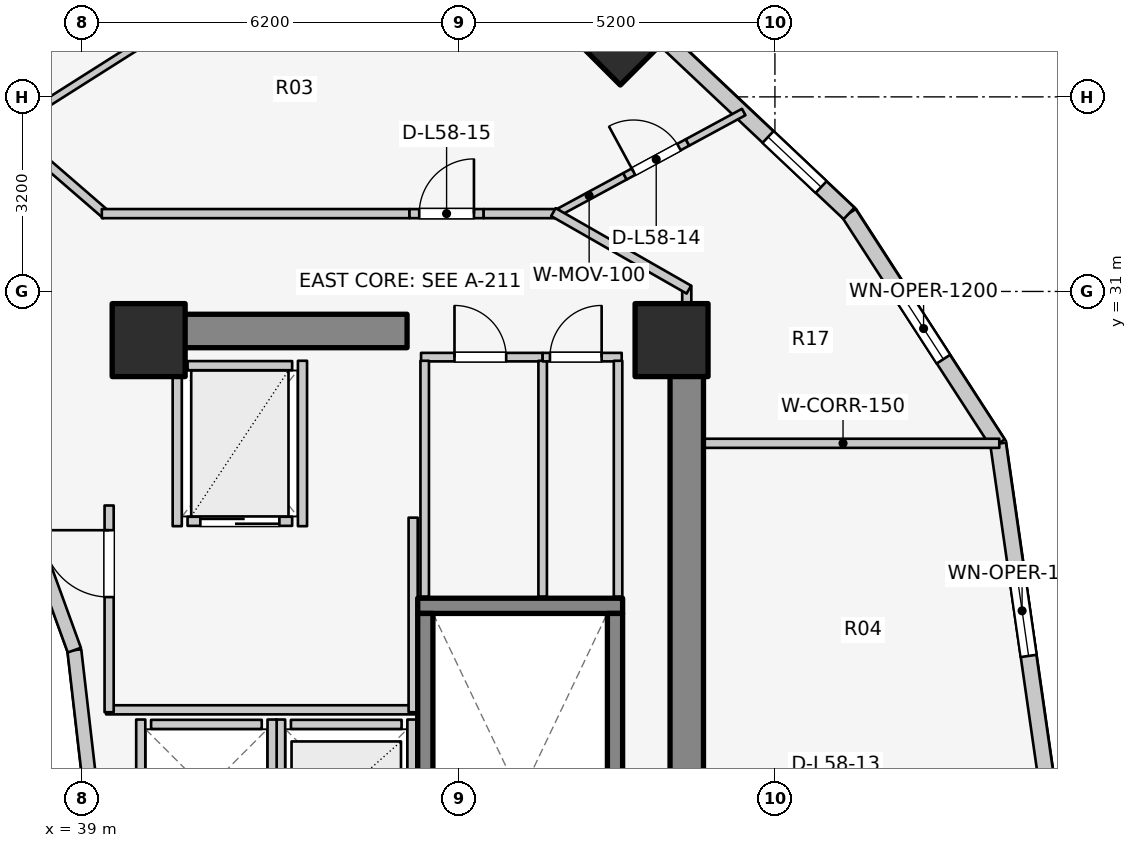
"""IFC4 building model, lengths in metres.
Left out: names, types, materials, properties, quantities, classifications, styles, units other than length and angle.
Written with IfcOpenShell. Run it as: python <this file> out.ifc"""

import sys

from ifc_helpers import new_model, si_unit, direction, frame, frame_2d, origin, origin_2d, place, context, subcontext, project, spatial, rectangle, extrude, element, fill, save


model = new_model("IFC4")
c1 = context("Model", 3, precision=1e-05, world=origin(), true_north=direction((0.0, 1.0)))
c2 = subcontext(c1, "Body", "Model", "MODEL_VIEW")
j1 = project(units=[si_unit("LENGTHUNIT", "METRE"), si_unit("PLANEANGLEUNIT", "RADIAN")], contexts=[c1])
p1 = place(None, origin())
s1 = spatial("IfcSite", under=j1, at=p1, CompositionType="ELEMENT")
p2 = place(p1, origin())
s2 = spatial("IfcBuilding", under=s1, at=p2, CompositionType="ELEMENT")
p3 = place(p2, frame((0.0, 0.0, 190.1)))
s3 = spatial("IfcBuildingStorey", under=s2, at=p3, CompositionType="ELEMENT", Elevation=190.1)
p4 = place(p3, frame((48.95, 17.05, 0.0), z_axis=(0.0, 0.0, 1.0), x_axis=(0.0, 1.0, 0.0)))
e1 = element("IfcWall", 1, at=p4, inside=s3, PredefinedType="SHEAR", context=c2, shape_type="SweptSolid", body=[
    extrude(rectangle(XDim=12.8, YDim=0.55, at=frame_2d((6.4, 0.0))), origin(), (0.0, 0.0, 1.0), 3.1),
])
p5 = place(p3, frame((39.85, 30.35, 0.0), z_axis=(0.0, 0.0, 1.0), x_axis=(1.0, 0.0, 0.0)))
e2 = element("IfcWall", 2, at=p5, inside=s3, PredefinedType="SHEAR", context=c2, shape_type="SweptSolid", body=[
    extrude(rectangle(XDim=4.5, YDim=0.55, at=frame_2d((2.25, 0.0))), origin(), (0.0, 0.0, 1.0), 3.1),
])
p6 = place(p3, frame((44.525, 25.83, 0.0), z_axis=(0.0, 0.0, 1.0), x_axis=(1.0, 0.0, 0.0)))
e3 = element("IfcWall", 3, at=p6, inside=s3, PredefinedType="SOLIDWALL", context=c2, shape_type="SweptSolid", body=[
    extrude(rectangle(XDim=3.37, YDim=0.25, at=frame_2d((1.685, 0.0))), origin(), (0.0, 0.0, 1.0), 3.1),
])
for number, where, z_axis, x_axis in (
    (4, (44.65, 17.895, 0.0), (0.0, 0.0, 1.0), (0.0, 1.0, 0.0)),
    (5, (47.77, 17.895, 0.0), (0.0, 0.0, 1.0), (0.0, 1.0, 0.0)),
):
    element("IfcWall", number, at=place(p3, frame(where, z_axis=z_axis, x_axis=x_axis)), inside=s3, PredefinedType="SOLIDWALL", context=c2, shape_type="SweptSolid", body=[
        extrude(rectangle(XDim=7.81, YDim=0.25, at=frame_2d((3.905, 0.0))), origin(), (0.0, 0.0, 1.0), 3.1),
    ])
for number, where, z_axis, x_axis in (
    (6, (48.7, 30.2, 0.0), (0.0, 0.0, 1.0), (1.0, 0.0, 0.0)),
    (7, (40.1, 30.2, 0.0), (0.0, 0.0, 1.0), (1.0, 0.0, 0.0)),
):
    element("IfcColumn", number, at=place(p3, frame(where, z_axis=z_axis, x_axis=x_axis)), inside=s3, PredefinedType="COLUMN", context=c2, shape_type="SweptSolid", body=[
        extrude(rectangle(XDim=1.2, YDim=1.2, at=origin_2d()), origin(), (0.0, 0.0, 1.0), 3.1),
    ])
p7 = place(p3, frame((47.857, 35.031, 0.0), z_axis=(0.0, 0.0, 1.0), x_axis=(0.707106781187, 0.707106781187, 0.0)))
e8 = element("IfcColumn", 8, at=p7, inside=s3, PredefinedType="COLUMN", context=c2, shape_type="SweptSolid", body=[
    extrude(rectangle(XDim=0.9, YDim=0.9, at=origin_2d()), origin(), (0.0, 0.0, 1.0), 3.1),
])
p8 = place(p3, frame((39.12, 23.0, 0.0), z_axis=(0.0, 0.0, 1.0), x_axis=(-0.114711713601, 0.993398823617, 0.0)))
e9 = element("IfcWall", 9, at=p8, inside=s3, PredefinedType="STANDARD", context=c2, shape_type="SweptSolid", body=[
    extrude(rectangle(XDim=2.115, YDim=0.23, at=frame_2d((1.058, 0.0))), origin(), (0.0, 0.0, 1.0), 2.56),
])
p9 = place(p3, frame((38.877, 25.102, 0.0), z_axis=(0.0, 0.0, 1.0), x_axis=(-0.341423187295, 0.93990968033, 0.0)))
e10 = element("IfcWall", 10, at=p9, inside=s3, PredefinedType="STANDARD", context=c2, shape_type="SweptSolid", body=[
    extrude(rectangle(XDim=2.084, YDim=0.23, at=frame_2d((1.042, 0.0))), origin(), (0.0, 0.0, 1.0), 2.56),
])
p10 = place(p3, frame((54.86, 23.0, 0.0), z_axis=(0.0, 0.0, 1.0), x_axis=(-0.142227632286, 0.989833976288, 0.0)))
e11 = element("IfcWall", 11, at=p10, inside=s3, PredefinedType="STANDARD", context=c2, shape_type="SweptSolid", body=[
    extrude(rectangle(XDim=5.553, YDim=0.26, at=frame_2d((2.776, 0.0))), origin(), (0.0, 0.0, 1.0), 2.57),
])
p11 = place(p10, frame((2.027, 0.0, 0.75)))
e12 = element("IfcOpeningElement", 12, at=p11, cuts=e11, PredefinedType="OPENING", context=c2, shape_type="SweptSolid", body=[
    extrude(rectangle(XDim=1.5, YDim=1.6, at=frame_2d((0.75, 0.8))), frame((0.0, 0.14, 0.0), z_axis=(0.0, -1.0, 0.0), x_axis=(1.0, 0.0, 0.0)), (0.0, 0.0, 1.0), 0.28),
])
p12 = place(p3, frame((54.07, 28.497, 0.0), z_axis=(0.0, 0.0, 1.0), x_axis=(-0.543358984534, 0.839500454989, 0.0)))
e13 = element("IfcWall", 13, at=p12, inside=s3, PredefinedType="STANDARD", context=c2, shape_type="SweptSolid", body=[
    extrude(rectangle(XDim=4.511, YDim=0.26, at=frame_2d((2.256, 0.0))), origin(), (0.0, 0.0, 1.0), 1.22),
])
p13 = place(p12, frame((1.656, 0.0, 0.15)))
e14 = element("IfcOpeningElement", 14, at=p13, cuts=e13, PredefinedType="OPENING", context=c2, shape_type="SweptSolid", body=[
    extrude(rectangle(XDim=1.2, YDim=0.9, at=frame_2d((0.6, 0.45))), frame((0.0, 0.14, 0.0), z_axis=(0.0, -1.0, 0.0), x_axis=(1.0, 0.0, 0.0)), (0.0, 0.0, 1.0), 0.28),
])
p14 = place(p3, frame((51.619, 32.284, 0.0), z_axis=(0.0, 0.0, 1.0), x_axis=(-0.727667301037, 0.68593024354, 0.0)))
e15 = element("IfcWall", 15, at=p14, inside=s3, PredefinedType="STANDARD", context=c2, shape_type="SweptSolid", body=[
    extrude(rectangle(XDim=4.604, YDim=0.26, at=frame_2d((2.302, 0.0))), origin(), (0.0, 0.0, 1.0), 1.22),
])
p15 = place(p14, frame((0.631, 0.0, 0.15)))
e16 = element("IfcOpeningElement", 16, at=p15, cuts=e15, PredefinedType="OPENING", context=c2, shape_type="SweptSolid", body=[
    extrude(rectangle(XDim=1.2, YDim=0.9, at=frame_2d((0.6, 0.45))), frame((0.0, 0.14, 0.0), z_axis=(0.0, -1.0, 0.0), x_axis=(1.0, 0.0, 0.0)), (0.0, 0.0, 1.0), 0.28),
])
p16 = place(p3, frame((42.44, 23.88, 0.0), z_axis=(0.0, 0.0, 1.0), x_axis=(1.0, 0.0, 0.0)))
e17 = element("IfcWall", 17, at=p16, inside=s3, PredefinedType="SOLIDWALL", context=c2, shape_type="SweptSolid", body=[
    extrude(rectangle(XDim=1.82, YDim=0.15, at=frame_2d((0.91, 0.0))), origin(), (0.0, 0.0, 1.0), 2.575),
])
for number, where, z_axis, x_axis in (
    (18, (42.27, 21.64, 0.0), (0.0, 0.0, 1.0), (0.0, 1.0, 0.0)),
    (19, (44.43, 21.64, 0.0), (0.0, 0.0, 1.0), (0.0, 1.0, 0.0)),
):
    element("IfcWall", number, at=place(p3, frame(where, z_axis=z_axis, x_axis=x_axis)), inside=s3, PredefinedType="SOLIDWALL", context=c2, shape_type="SweptSolid", body=[
        extrude(rectangle(XDim=2.32, YDim=0.15, at=frame_2d((1.16, 0.0))), origin(), (0.0, 0.0, 1.0), 2.575),
    ])
p17 = place(p3, frame((40.14, 23.88, 0.0), z_axis=(0.0, 0.0, 1.0), x_axis=(1.0, 0.0, 0.0)))
e20 = element("IfcWall", 20, at=p17, inside=s3, PredefinedType="SOLIDWALL", context=c2, shape_type="SweptSolid", body=[
    extrude(rectangle(XDim=1.82, YDim=0.15, at=frame_2d((0.91, 0.0))), origin(), (0.0, 0.0, 1.0), 2.12),
])
p18 = place(p3, frame((39.97, 21.64, 0.0), z_axis=(0.0, 0.0, 1.0), x_axis=(0.0, 1.0, 0.0)))
e21 = element("IfcWall", 21, at=p18, inside=s3, PredefinedType="SOLIDWALL", context=c2, shape_type="SweptSolid", body=[
    extrude(rectangle(XDim=2.32, YDim=0.15, at=frame_2d((1.16, 0.0))), origin(), (0.0, 0.0, 1.0), 2.12),
])
p19 = place(p3, frame((42.13, 21.64, 0.0), z_axis=(0.0, 0.0, 1.0), x_axis=(0.0, 1.0, 0.0)))
e22 = element("IfcWall", 22, at=p19, inside=s3, PredefinedType="SOLIDWALL", context=c2, shape_type="SweptSolid", body=[
    extrude(rectangle(XDim=2.32, YDim=0.15, at=frame_2d((1.16, 0.0))), origin(), (0.0, 0.0, 1.0), 2.575),
])
p20 = place(p3, frame((40.74, 27.22, 0.0), z_axis=(0.0, 0.0, 1.0), x_axis=(1.0, 0.0, 0.0)))
e23 = element("IfcWall", 23, at=p20, inside=s3, PredefinedType="SOLIDWALL", context=c2, shape_type="SweptSolid", body=[
    extrude(rectangle(XDim=1.72, YDim=0.15, at=frame_2d((0.86, 0.0))), origin(), (0.0, 0.0, 1.0), 2.575),
])
p21 = place(p20, frame((0.21, 0.0, 0.0)))
e24 = element("IfcOpeningElement", 24, at=p21, cuts=e23, PredefinedType="OPENING", context=c2, shape_type="SweptSolid", body=[
    extrude(rectangle(XDim=1.3, YDim=2.1, at=frame_2d((0.65, 1.05))), frame((0.0, 0.085, 0.0), z_axis=(0.0, -1.0, 0.0), x_axis=(1.0, 0.0, 0.0)), (0.0, 0.0, 1.0), 0.17),
])
p22 = place(p3, frame((40.74, 29.78, 0.0), z_axis=(0.0, 0.0, 1.0), x_axis=(1.0, 0.0, 0.0)))
e25 = element("IfcWall", 25, at=p22, inside=s3, PredefinedType="SOLIDWALL", context=c2, shape_type="SweptSolid", body=[
    extrude(rectangle(XDim=1.72, YDim=0.15, at=frame_2d((0.86, 0.0))), origin(), (0.0, 0.0, 1.0), 2.575),
])
for number, where, z_axis, x_axis in (
    (26, (40.57, 27.14, 0.0), (0.0, 0.0, 1.0), (0.0, 1.0, 0.0)),
    (27, (42.63, 27.14, 0.0), (0.0, 0.0, 1.0), (0.0, 1.0, 0.0)),
):
    element("IfcWall", number, at=place(p3, frame(where, z_axis=z_axis, x_axis=x_axis)), inside=s3, PredefinedType="SOLIDWALL", context=c2, shape_type="SweptSolid", body=[
        extrude(rectangle(XDim=2.72, YDim=0.15, at=frame_2d((1.36, 0.0))), origin(), (0.0, 0.0, 1.0), 2.575),
    ])
p23 = place(p3, frame((39.4, 24.12, 0.0), z_axis=(0.0, 0.0, 1.0), x_axis=(1.0, 0.0, 0.0)))
e28 = element("IfcWall", 28, at=p23, inside=s3, PredefinedType="PARTITIONING", context=c2, shape_type="SweptSolid", body=[
    extrude(rectangle(XDim=5.08, YDim=0.15, at=frame_2d((2.54, 0.0))), origin(), (0.0, 0.0, 1.0), 2.12),
])
p24 = place(p3, frame((44.45, 24.08, 0.0), z_axis=(0.0, 0.0, 1.0), x_axis=(0.0, 1.0, 0.0)))
e29 = element("IfcWall", 29, at=p24, inside=s3, PredefinedType="PARTITIONING", context=c2, shape_type="SweptSolid", body=[
    extrude(rectangle(XDim=3.2, YDim=0.15, at=frame_2d((1.6, 0.0))), origin(), (0.0, 0.0, 1.0), 2.575),
])
p25 = place(p3, frame((39.45, 24.08, 0.0), z_axis=(0.0, 0.0, 1.0), x_axis=(0.0, 1.0, 0.0)))
e30 = element("IfcWall", 30, at=p25, inside=s3, PredefinedType="PARTITIONING", context=c2, shape_type="SweptSolid", body=[
    extrude(rectangle(XDim=3.4, YDim=0.15, at=frame_2d((1.7, 0.0))), origin(), (0.0, 0.0, 1.0), 2.575),
])
p26 = place(p25, frame((1.894, 0.0, 0.0)))
e31 = element("IfcOpeningElement", 31, at=p26, cuts=e30, PredefinedType="OPENING", context=c2, shape_type="SweptSolid", body=[
    extrude(rectangle(XDim=1.1, YDim=2.1, at=frame_2d((0.55, 1.05))), frame((0.0, 0.085, 0.0), z_axis=(0.0, -1.0, 0.0), x_axis=(1.0, 0.0, 0.0)), (0.0, 0.0, 1.0), 0.17),
])
p27 = place(p3, frame((44.58, 29.92, 0.0), z_axis=(0.0, 0.0, 1.0), x_axis=(1.0, 0.0, 0.0)))
e32 = element("IfcWall", 32, at=p27, inside=s3, PredefinedType="PLUMBINGWALL", context=c2, shape_type="SweptSolid", body=[
    extrude(rectangle(XDim=2.0, YDim=0.14, at=frame_2d((1.0, 0.0))), origin(), (0.0, 0.0, 1.0), 2.575),
])
p28 = place(p27, frame((0.55, 0.0, 0.0)))
e33 = element("IfcOpeningElement", 33, at=p28, cuts=e32, PredefinedType="OPENING", context=c2, shape_type="SweptSolid", body=[
    extrude(rectangle(XDim=0.85, YDim=2.05, at=frame_2d((0.425, 1.025))), frame((0.0, 0.08, 0.0), z_axis=(0.0, -1.0, 0.0), x_axis=(1.0, 0.0, 0.0)), (0.0, 0.0, 1.0), 0.16),
])
for number, where, z_axis, x_axis in (
    (34, (44.64, 25.98, 0.0), (0.0, 0.0, 1.0), (0.0, 1.0, 0.0)),
    (35, (46.58, 25.98, 0.0), (0.0, 0.0, 1.0), (0.0, 1.0, 0.0)),
):
    element("IfcWall", number, at=place(p3, frame(where, z_axis=z_axis, x_axis=x_axis)), inside=s3, PredefinedType="PLUMBINGWALL", context=c2, shape_type="SweptSolid", body=[
        extrude(rectangle(XDim=3.88, YDim=0.14, at=frame_2d((1.94, 0.0))), origin(), (0.0, 0.0, 1.0), 2.575),
    ])
p29 = place(p3, frame((46.58, 29.92, 0.0), z_axis=(0.0, 0.0, 1.0), x_axis=(1.0, 0.0, 0.0)))
e36 = element("IfcWall", 36, at=p29, inside=s3, PredefinedType="PLUMBINGWALL", context=c2, shape_type="SweptSolid", body=[
    extrude(rectangle(XDim=1.3, YDim=0.14, at=frame_2d((0.65, 0.0))), origin(), (0.0, 0.0, 1.0), 2.575),
])
p30 = place(p29, frame((0.12, 0.0, 0.0)))
e37 = element("IfcOpeningElement", 37, at=p30, cuts=e36, PredefinedType="OPENING", context=c2, shape_type="SweptSolid", body=[
    extrude(rectangle(XDim=0.85, YDim=2.05, at=frame_2d((0.425, 1.025))), frame((0.0, 0.08, 0.0), z_axis=(0.0, -1.0, 0.0), x_axis=(1.0, 0.0, 0.0)), (0.0, 0.0, 1.0), 0.16),
])
p31 = place(p3, frame((47.82, 25.98, 0.0), z_axis=(0.0, 0.0, 1.0), x_axis=(0.0, 1.0, 0.0)))
e38 = element("IfcWall", 38, at=p31, inside=s3, PredefinedType="PLUMBINGWALL", context=c2, shape_type="SweptSolid", body=[
    extrude(rectangle(XDim=3.88, YDim=0.14, at=frame_2d((1.94, 0.0))), origin(), (0.0, 0.0, 1.0), 2.575),
])
p32 = place(p3, frame((48.95, 28.503, 0.0), z_axis=(0.0, 0.0, 1.0), x_axis=(1.0, 0.0, 0.0)))
e39 = element("IfcWall", 39, at=p32, inside=s3, PredefinedType="PARTITIONING", context=c2, shape_type="SweptSolid", body=[
    extrude(rectangle(XDim=5.14, YDim=0.15, at=frame_2d((2.57, 0.0))), origin(), (0.0, 0.0, 1.0), 2.575),
])
p33 = place(p3, frame((48.95, 29.8, 0.0), z_axis=(0.0, 0.0, 1.0), x_axis=(0.0, 1.0, 0.0)))
e40 = element("IfcWall", 40, at=p33, inside=s3, PredefinedType="PARTITIONING", context=c2, shape_type="SweptSolid", body=[
    extrude(rectangle(XDim=1.29, YDim=0.15, at=frame_2d((0.645, 0.0))), origin(), (0.0, 0.0, 1.0), 1.22),
])
p34 = place(p3, frame((46.756, 32.256, 0.0), z_axis=(0.0, 0.0, 1.0), x_axis=(0.879396983738, 0.476089219572, 0.0)))
e41 = element("IfcWall", 41, at=p34, inside=s3, PredefinedType="MOVABLE", context=c2, shape_type="SweptSolid", body=[
    extrude(rectangle(XDim=1.338, YDim=0.12, at=frame_2d((0.669, 0.0))), origin(), (0.0, 0.0, 1.0), 1.22),
])
p35 = place(p3, frame((47.933, 32.893, 0.0), z_axis=(0.0, 0.0, 1.0), x_axis=(0.879342939039, 0.476189033433, 0.0)))
e42 = element("IfcWall", 42, at=p35, inside=s3, PredefinedType="MOVABLE", context=c2, shape_type="SweptSolid", body=[
    extrude(rectangle(XDim=1.17, YDim=0.12, at=frame_2d((0.585, 0.0))), origin(), (0.0, 0.0, 1.0), 2.11),
])
p36 = place(p35, frame((0.16, 0.0, 0.0)))
e43 = element("IfcOpeningElement", 43, at=p36, cuts=e42, PredefinedType="OPENING", context=c2, shape_type="SweptSolid", body=[
    extrude(rectangle(XDim=0.85, YDim=2.05, at=frame_2d((0.425, 1.025))), frame((0.0, 0.07, 0.0), z_axis=(0.0, -1.0, 0.0), x_axis=(1.0, 0.0, 0.0)), (0.0, 0.0, 1.0), 0.14),
])
p37 = place(p3, frame((48.962, 33.45, 0.0), z_axis=(0.0, 0.0, 1.0), x_axis=(0.879417553007, 0.476051223571, 0.0)))
e44 = element("IfcWall", 44, at=p37, inside=s3, PredefinedType="MOVABLE", context=c2, shape_type="SweptSolid", body=[
    extrude(rectangle(XDim=1.051, YDim=0.12, at=frame_2d((0.526, 0.0))), origin(), (0.0, 0.0, 1.0), 2.575),
])
p38 = place(p3, frame((37.807, 33.642, 0.0), z_axis=(0.0, 0.0, 1.0), x_axis=(0.756055312247, -0.654507727092, 0.0)))
e45 = element("IfcWall", 45, at=p38, inside=s3, PredefinedType="PARTITIONING", context=c2, shape_type="SweptSolid", body=[
    extrude(rectangle(XDim=2.111, YDim=0.15, at=frame_2d((1.055, 0.0))), origin(), (0.0, 0.0, 1.0), 1.22),
])
p39 = place(p3, frame((39.33, 32.28, 0.0), z_axis=(0.0, 0.0, 1.0), x_axis=(1.0, 0.0, 0.0)))
e46 = element("IfcWall", 46, at=p39, inside=s3, PredefinedType="PARTITIONING", context=c2, shape_type="SweptSolid", body=[
    extrude(rectangle(XDim=5.06, YDim=0.15, at=frame_2d((2.53, 0.0))), origin(), (0.0, 0.0, 1.0), 1.22),
])
p40 = place(p3, frame((44.39, 32.28, 0.0), z_axis=(0.0, 0.0, 1.0), x_axis=(1.0, 0.0, 0.0)))
e47 = element("IfcWall", 47, at=p40, inside=s3, PredefinedType="PARTITIONING", context=c2, shape_type="SweptSolid", body=[
    extrude(rectangle(XDim=1.22, YDim=0.15, at=frame_2d((0.61, 0.0))), origin(), (0.0, 0.0, 1.0), 2.16),
])
p41 = place(p40, frame((0.16, 0.0, 0.0)))
e48 = element("IfcOpeningElement", 48, at=p41, cuts=e47, PredefinedType="OPENING", context=c2, shape_type="SweptSolid", body=[
    extrude(rectangle(XDim=0.9, YDim=2.1, at=frame_2d((0.45, 1.05))), frame((0.0, 0.085, 0.0), z_axis=(0.0, -1.0, 0.0), x_axis=(1.0, 0.0, 0.0)), (0.0, 0.0, 1.0), 0.17),
])
p42 = place(p3, frame((45.61, 32.28, 0.0), z_axis=(0.0, 0.0, 1.0), x_axis=(1.0, 0.0, 0.0)))
e49 = element("IfcWall", 49, at=p42, inside=s3, PredefinedType="PARTITIONING", context=c2, shape_type="SweptSolid", body=[
    extrude(rectangle(XDim=1.24, YDim=0.15, at=frame_2d((0.62, 0.0))), origin(), (0.0, 0.0, 1.0), 2.575),
])
p43 = place(p3, frame((46.757, 32.305, 0.0), z_axis=(0.0, 0.0, 1.0), x_axis=(0.867991349648, -0.496579315857, 0.0)))
e50 = element("IfcWall", 50, at=p43, inside=s3, PredefinedType="PARTITIONING", context=c2, shape_type="SweptSolid", body=[
    extrude(rectangle(XDim=2.567, YDim=0.15, at=frame_2d((1.283, 0.0))), origin(), (0.0, 0.0, 1.0), 1.22),
])
p44 = place(p3, frame((37.812, 33.708, 0.0), z_axis=(0.0, 0.0, 1.0), x_axis=(0.844640430122, 0.535334048799, 0.0)))
e51 = element("IfcWall", 51, at=p44, inside=s3, PredefinedType="PARTITIONING", context=c2, shape_type="SweptSolid", body=[
    extrude(rectangle(XDim=7.188, YDim=0.125, at=frame_2d((3.594, 0.0))), origin(), (0.0, 0.0, 1.0), 1.22),
])
p45 = place(p3, frame((35.02, 34.952, 0.0), z_axis=(0.0, 0.0, 1.0), x_axis=(0.647173462792, 0.762342776615, 0.0)))
e52 = element("IfcWall", 52, at=p45, inside=s3, PredefinedType="PARTITIONING", context=c2, shape_type="SweptSolid", body=[
    extrude(rectangle(XDim=6.253, YDim=0.125, at=frame_2d((3.127, 0.0))), origin(), (0.0, 0.0, 1.0), 1.22),
])
p46 = place(p11, origin())
e53 = element("IfcWindow", 53, at=p46, inside=s3, PartitioningType="SINGLE_PANEL", PredefinedType="WINDOW", context=c2, shape_type="SweptSolid", body=[
    extrude(rectangle(XDim=1.5, YDim=1.6, at=frame_2d((0.75, 0.8))), frame((0.0, 0.03, 0.0), z_axis=(0.0, -1.0, 0.0), x_axis=(1.0, 0.0, 0.0)), (0.0, 0.0, 1.0), 0.06),
])
fill(e12, e53)
p47 = place(p13, origin())
e54 = element("IfcWindow", 54, at=p47, inside=s3, PartitioningType="SINGLE_PANEL", PredefinedType="WINDOW", context=c2, shape_type="SweptSolid", body=[
    extrude(rectangle(XDim=1.2, YDim=0.9, at=frame_2d((0.6, 0.45))), frame((0.0, 0.03, 0.0), z_axis=(0.0, -1.0, 0.0), x_axis=(1.0, 0.0, 0.0)), (0.0, 0.0, 1.0), 0.06),
])
fill(e14, e54)
p48 = place(p15, origin())
e55 = element("IfcWindow", 55, at=p48, inside=s3, PartitioningType="SINGLE_PANEL", PredefinedType="WINDOW", context=c2, shape_type="SweptSolid", body=[
    extrude(rectangle(XDim=1.2, YDim=0.9, at=frame_2d((0.6, 0.45))), frame((0.0, 0.03, 0.0), z_axis=(0.0, -1.0, 0.0), x_axis=(1.0, 0.0, 0.0)), (0.0, 0.0, 1.0), 0.06),
])
fill(e16, e55)
p49 = place(p21, origin())
e56 = element("IfcDoor", 56, at=p49, inside=s3, OperationType="DOUBLE_DOOR_SLIDING", PredefinedType="DOOR", context=c2, shape_type="SweptSolid", body=[
    extrude(rectangle(XDim=1.3, YDim=2.1, at=frame_2d((0.65, 1.05))), frame((0.0, 0.025, 0.0), z_axis=(0.0, -1.0, 0.0), x_axis=(1.0, 0.0, 0.0)), (0.0, 0.0, 1.0), 0.05),
])
fill(e24, e56)
p50 = place(p26, origin())
e57 = element("IfcDoor", 57, at=p50, inside=s3, OperationType="SINGLE_SWING_RIGHT", PredefinedType="DOOR", context=c2, shape_type="SweptSolid", body=[
    extrude(rectangle(XDim=1.1, YDim=2.1, at=frame_2d((0.55, 1.05))), frame((0.0, 0.025, 0.0), z_axis=(0.0, -1.0, 0.0), x_axis=(1.0, 0.0, 0.0)), (0.0, 0.0, 1.0), 0.05),
])
fill(e31, e57)
p51 = place(p28, origin())
e58 = element("IfcDoor", 58, at=p51, inside=s3, OperationType="SINGLE_SWING_LEFT", PredefinedType="DOOR", context=c2, shape_type="SweptSolid", body=[
    extrude(rectangle(XDim=0.85, YDim=2.05, at=frame_2d((0.425, 1.025))), frame((0.0, 0.025, 0.0), z_axis=(0.0, -1.0, 0.0), x_axis=(1.0, 0.0, 0.0)), (0.0, 0.0, 1.0), 0.05),
])
fill(e33, e58)
p52 = place(p30, origin())
e59 = element("IfcDoor", 59, at=p52, inside=s3, OperationType="SINGLE_SWING_RIGHT", PredefinedType="DOOR", context=c2, shape_type="SweptSolid", body=[
    extrude(rectangle(XDim=0.85, YDim=2.05, at=frame_2d((0.425, 1.025))), frame((0.0, 0.025, 0.0), z_axis=(0.0, -1.0, 0.0), x_axis=(1.0, 0.0, 0.0)), (0.0, 0.0, 1.0), 0.05),
])
fill(e37, e59)
p53 = place(p36, origin())
e60 = element("IfcDoor", 60, at=p53, inside=s3, OperationType="SINGLE_SWING_LEFT", PredefinedType="DOOR", context=c2, shape_type="SweptSolid", body=[
    extrude(rectangle(XDim=0.85, YDim=2.05, at=frame_2d((0.425, 1.025))), frame((0.0, 0.025, 0.0), z_axis=(0.0, -1.0, 0.0), x_axis=(1.0, 0.0, 0.0)), (0.0, 0.0, 1.0), 0.05),
])
fill(e43, e60)
p54 = place(p41, origin())
e61 = element("IfcDoor", 61, at=p54, inside=s3, OperationType="SINGLE_SWING_RIGHT", PredefinedType="DOOR", context=c2, shape_type="SweptSolid", body=[
    extrude(rectangle(XDim=0.9, YDim=2.1, at=frame_2d((0.45, 1.05))), frame((0.0, 0.025, 0.0), z_axis=(0.0, -1.0, 0.0), x_axis=(1.0, 0.0, 0.0)), (0.0, 0.0, 1.0), 0.05),
])
fill(e48, e61)
save(model, sys.argv[1])
